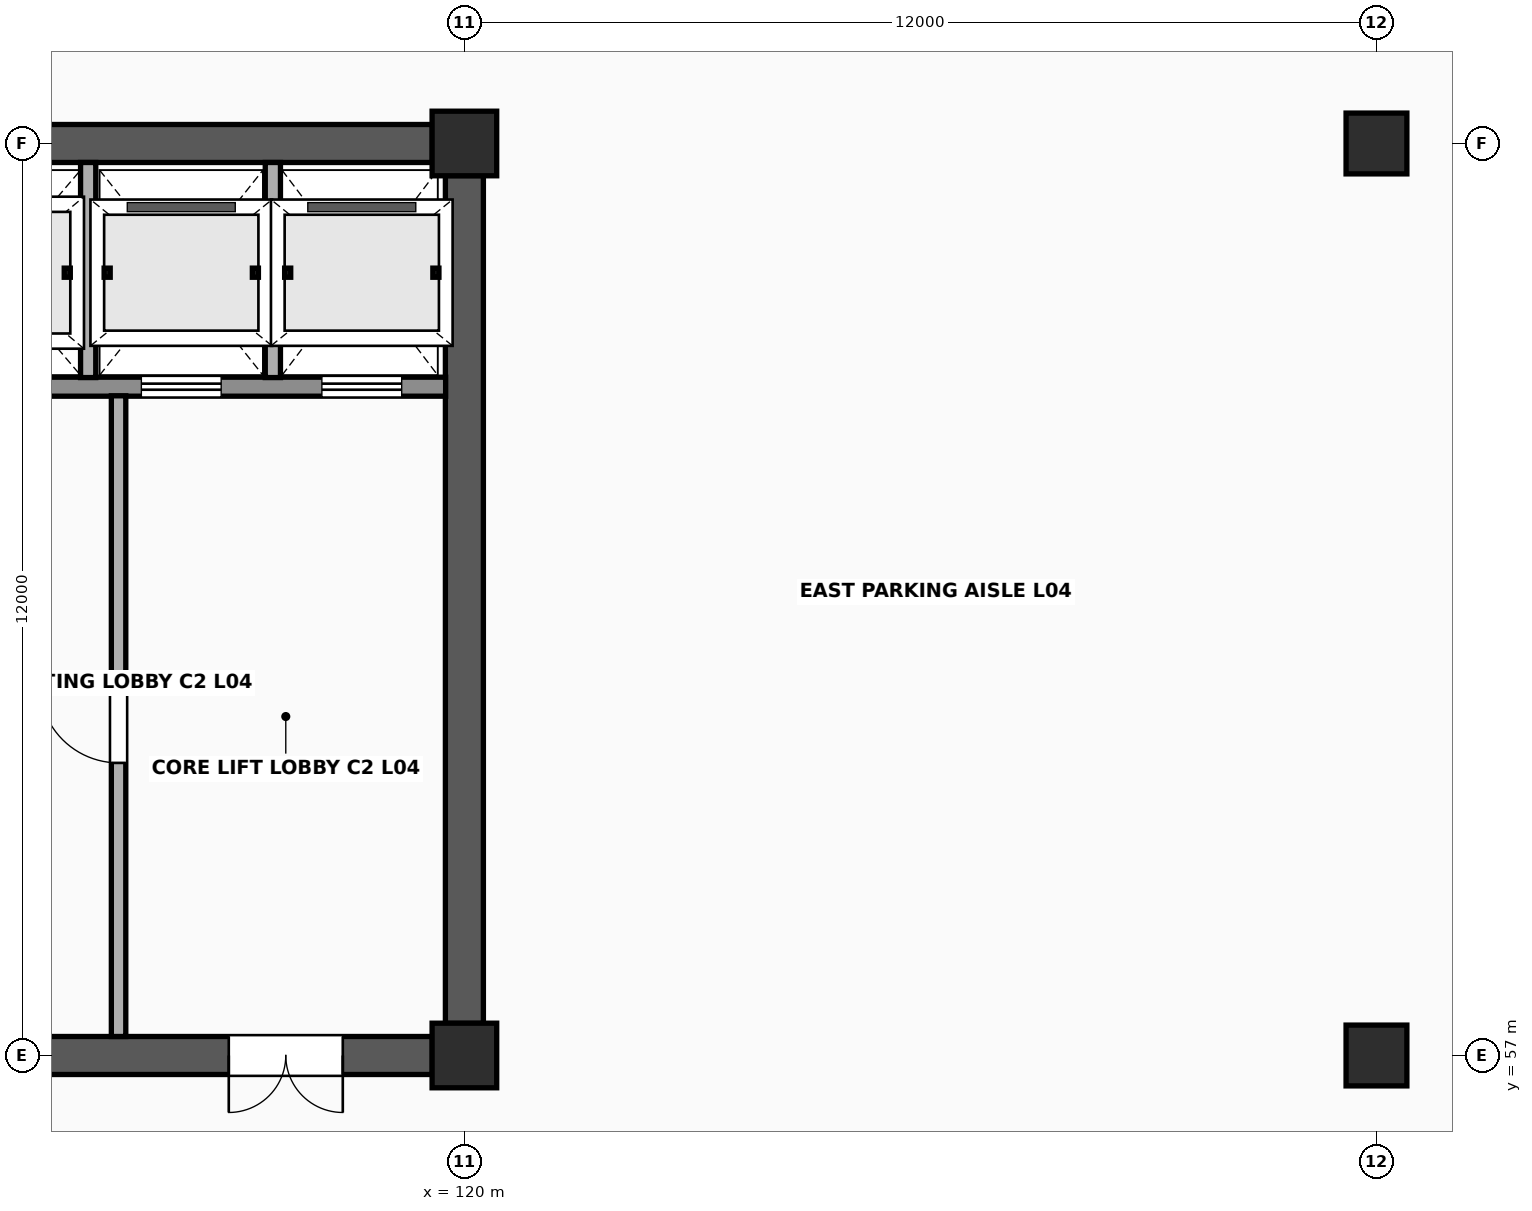
"""IFC4 building model, lengths in metres.
Left out: names, types, materials, properties, quantities, classifications, styles, units other than length and angle.
Written with IfcOpenShell. Run it as: python <this file> out.ifc"""

import sys

from ifc_helpers import new_model, si_unit, direction, frame, frame_2d, origin, origin_2d, place, context, subcontext, project, spatial, rectangle, extrude, element, fill, save


model = new_model("IFC4")
c1 = context("Model", 3, precision=1e-05, world=origin(), true_north=direction((0.0, 1.0)))
c2 = subcontext(c1, "Body", "Model", "MODEL_VIEW")
j1 = project(units=[si_unit("LENGTHUNIT", "METRE"), si_unit("PLANEANGLEUNIT", "RADIAN")], contexts=[c1])
p1 = place(None, origin())
s1 = spatial("IfcSite", under=j1, at=p1, CompositionType="ELEMENT")
p2 = place(p1, origin())
s2 = spatial("IfcBuilding", under=s1, at=p2, CompositionType="ELEMENT")
p3 = place(p2, frame((0.0, 0.0, 17.2)))
s3 = spatial("IfcBuildingStorey", under=s2, at=p3, CompositionType="ELEMENT", Elevation=17.2)
for number, where, z_axis, x_axis in (
    (1, (120.0, 57.0, 0.0), (0.0, 0.0, 1.0), (1.0, 0.0, 0.0)),
    (2, (120.0, 69.0, 0.0), (0.0, 0.0, 1.0), (1.0, 0.0, 0.0)),
):
    element("IfcColumn", number, at=place(p3, frame(where, z_axis=z_axis, x_axis=x_axis)), inside=s3, PredefinedType="COLUMN", context=c2, shape_type="SweptSolid", body=[
        extrude(rectangle(XDim=0.85, YDim=0.85, at=origin_2d()), origin(), (0.0, 0.0, 1.0), 3.8),
    ])
for number, where, z_axis, x_axis in (
    (3, (132.0, 57.0, 0.0), (0.0, 0.0, 1.0), (1.0, 0.0, 0.0)),
    (4, (132.0, 69.0, 0.0), (0.0, 0.0, 1.0), (1.0, 0.0, 0.0)),
):
    element("IfcColumn", number, at=place(p3, frame(where, z_axis=z_axis, x_axis=x_axis)), inside=s3, PredefinedType="COLUMN", context=c2, shape_type="SweptSolid", body=[
        extrude(rectangle(XDim=0.8, YDim=0.8, at=origin_2d()), origin(), (0.0, 0.0, 1.0), 3.8),
    ])
p4 = place(p3, frame((108.422, 57.0, 0.0), z_axis=(0.0, 0.0, 1.0), x_axis=(1.0, 0.0, 0.0)))
e5 = element("IfcWall", 5, at=p4, inside=s3, PredefinedType="SHEAR", context=c2, shape_type="SweptSolid", body=[
    extrude(rectangle(XDim=11.156, YDim=0.5, at=frame_2d((5.578, 0.0))), origin(), (0.0, 0.0, 1.0), 3.643),
])
p5 = place(p4, frame((4.778, 0.0, 0.0)))
e6 = element("IfcOpeningElement", 6, at=p5, cuts=e5, PredefinedType="OPENING", context=c2, shape_type="SweptSolid", body=[
    extrude(rectangle(XDim=1.2, YDim=2.2, at=frame_2d((0.6, 1.1))), frame((0.0, 0.265, 0.0), z_axis=(0.0, -1.0, 0.0), x_axis=(1.0, 0.0, 0.0)), (0.0, 0.0, 1.0), 0.53),
])
p6 = place(p4, frame((8.478, 0.0, 0.0)))
e7 = element("IfcOpeningElement", 7, at=p6, cuts=e5, PredefinedType="OPENING", context=c2, shape_type="SweptSolid", body=[
    extrude(rectangle(XDim=1.5, YDim=2.25, at=frame_2d((0.75, 1.125))), frame((0.0, 0.265, 0.0), z_axis=(0.0, -1.0, 0.0), x_axis=(1.0, 0.0, 0.0)), (0.0, 0.0, 1.0), 0.53),
])
for number, where, z_axis, x_axis in (
    (8, (108.422, 69.0, 0.0), (0.0, 0.0, 1.0), (1.0, 0.0, 0.0)),
    (9, (120.0, 57.422, 0.0), (0.0, 0.0, 1.0), (0.0, 1.0, 0.0)),
):
    element("IfcWall", number, at=place(p3, frame(where, z_axis=z_axis, x_axis=x_axis)), inside=s3, PredefinedType="SHEAR", context=c2, shape_type="SweptSolid", body=[
        extrude(rectangle(XDim=11.156, YDim=0.5, at=frame_2d((5.578, 0.0))), origin(), (0.0, 0.0, 1.0), 3.643),
    ])
p7 = place(p3, frame((112.597, 65.8, 0.0), z_axis=(0.0, 0.0, 1.0), x_axis=(1.0, 0.0, 0.0)))
e10 = element("IfcWall", 10, at=p7, inside=s3, PredefinedType="SOLIDWALL", context=c2, shape_type="SweptSolid", body=[
    extrude(rectangle(XDim=7.156, YDim=0.25, at=frame_2d((3.578, 0.0))), origin(), (0.0, 0.0, 1.0), 3.643),
])
p8 = place(p7, frame((0.653, 0.0, 0.0)))
e11 = element("IfcOpeningElement", 11, at=p8, cuts=e10, PredefinedType="OPENING", context=c2, shape_type="SweptSolid", body=[
    extrude(rectangle(XDim=1.1, YDim=2.24, at=frame_2d((0.55, 1.12))), frame((0.0, 0.14, 0.0), z_axis=(0.0, -1.0, 0.0), x_axis=(1.0, 0.0, 0.0)), (0.0, 0.0, 1.0), 0.28),
])
p9 = place(p7, frame((3.153, 0.0, 0.0)))
e12 = element("IfcOpeningElement", 12, at=p9, cuts=e10, PredefinedType="OPENING", context=c2, shape_type="SweptSolid", body=[
    extrude(rectangle(XDim=1.05, YDim=2.2, at=frame_2d((0.525, 1.1))), frame((0.0, 0.14, 0.0), z_axis=(0.0, -1.0, 0.0), x_axis=(1.0, 0.0, 0.0)), (0.0, 0.0, 1.0), 0.28),
])
p10 = place(p7, frame((5.528, 0.0, 0.0)))
e13 = element("IfcOpeningElement", 13, at=p10, cuts=e10, PredefinedType="OPENING", context=c2, shape_type="SweptSolid", body=[
    extrude(rectangle(XDim=1.05, YDim=2.2, at=frame_2d((0.525, 1.1))), frame((0.0, 0.14, 0.0), z_axis=(0.0, -1.0, 0.0), x_axis=(1.0, 0.0, 0.0)), (0.0, 0.0, 1.0), 0.28),
])
for number, where, z_axis, x_axis in (
    (14, (115.05, 65.92, 0.0), (0.0, 0.0, 1.0), (0.0, 1.0, 0.0)),
    (15, (117.48, 65.92, 0.0), (0.0, 0.0, 1.0), (0.0, 1.0, 0.0)),
):
    element("IfcWall", number, at=place(p3, frame(where, z_axis=z_axis, x_axis=x_axis)), inside=s3, PredefinedType="SOLIDWALL", context=c2, shape_type="SweptSolid", body=[
        extrude(rectangle(XDim=2.83, YDim=0.2, at=frame_2d((1.415, 0.0))), origin(), (0.0, 0.0, 1.0), 3.633),
    ])
p11 = place(p3, frame((115.45, 57.25, 0.0), z_axis=(0.0, 0.0, 1.0), x_axis=(0.0, 1.0, 0.0)))
e16 = element("IfcWall", 16, at=p11, inside=s3, PredefinedType="SOLIDWALL", context=c2, shape_type="SweptSolid", body=[
    extrude(rectangle(XDim=8.43, YDim=0.19, at=frame_2d((4.215, 0.0))), origin(), (0.0, 0.0, 1.0), 3.633),
])
p12 = place(p11, frame((3.6, 0.0, 0.0)))
e17 = element("IfcOpeningElement", 17, at=p12, cuts=e16, PredefinedType="OPENING", context=c2, shape_type="SweptSolid", body=[
    extrude(rectangle(XDim=1.04, YDim=2.18, at=frame_2d((0.52, 1.09))), frame((0.0, 0.11, 0.0), z_axis=(0.0, -1.0, 0.0), x_axis=(1.0, 0.0, 0.0)), (0.0, 0.0, 1.0), 0.22),
])
p13 = place(p12, origin())
e18 = element("IfcDoor", 18, at=p13, inside=s3, OperationType="SINGLE_SWING_RIGHT", PredefinedType="DOOR", context=c2, shape_type="SweptSolid", body=[
    extrude(rectangle(XDim=1.04, YDim=2.18, at=frame_2d((0.52, 1.09))), frame((0.0, 0.025, 0.0), z_axis=(0.0, -1.0, 0.0), x_axis=(1.0, 0.0, 0.0)), (0.0, 0.0, 1.0), 0.05),
])
fill(e17, e18)
p14 = place(p6, origin())
e19 = element("IfcDoor", 19, at=p14, inside=s3, OperationType="DOUBLE_DOOR_SINGLE_SWING", PredefinedType="DOOR", context=c2, shape_type="SweptSolid", body=[
    extrude(rectangle(XDim=1.5, YDim=2.25, at=frame_2d((0.75, 1.125))), frame((0.0, 0.025, 0.0), z_axis=(0.0, -1.0, 0.0), x_axis=(1.0, 0.0, 0.0)), (0.0, 0.0, 1.0), 0.05),
])
fill(e7, e19)
p15 = place(p9, origin())
e20 = element("IfcDoor", 20, at=p15, inside=s3, OperationType="SLIDING_TO_LEFT", PredefinedType="USERDEFINED", context=c2, shape_type="SweptSolid", body=[
    extrude(rectangle(XDim=1.05, YDim=2.2, at=frame_2d((0.525, 1.1))), frame((0.0, 0.025, 0.0), z_axis=(0.0, -1.0, 0.0), x_axis=(1.0, 0.0, 0.0)), (0.0, 0.0, 1.0), 0.05),
])
fill(e12, e20)
p16 = place(p10, origin())
e21 = element("IfcDoor", 21, at=p16, inside=s3, OperationType="SLIDING_TO_LEFT", PredefinedType="USERDEFINED", context=c2, shape_type="SweptSolid", body=[
    extrude(rectangle(XDim=1.05, YDim=2.2, at=frame_2d((0.525, 1.1))), frame((0.0, 0.025, 0.0), z_axis=(0.0, -1.0, 0.0), x_axis=(1.0, 0.0, 0.0)), (0.0, 0.0, 1.0), 0.05),
])
fill(e13, e21)
save(model, sys.argv[1])
